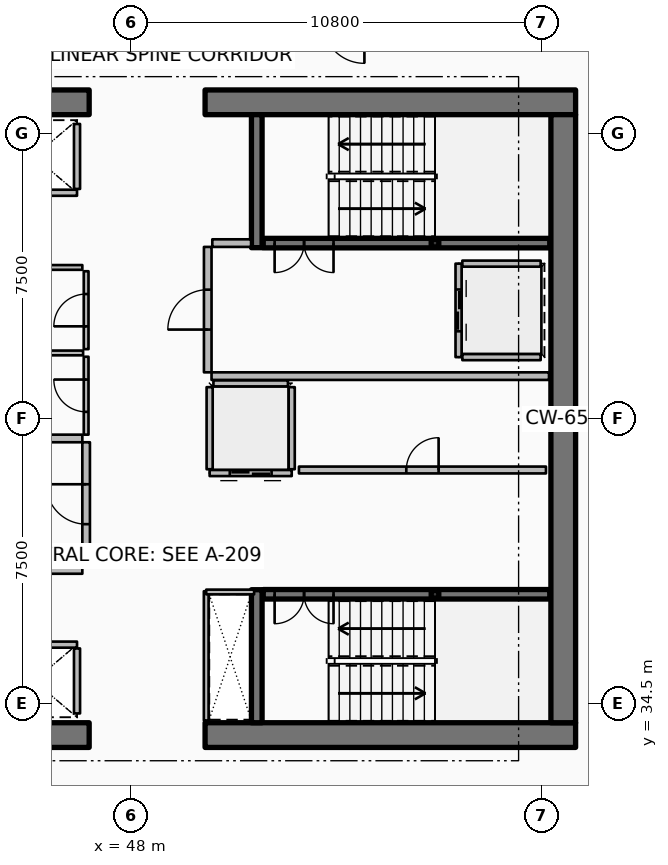
"""IFC4 building model, lengths in metres.
Left out: names, types, materials, properties, quantities, classifications, styles, units other than length and angle.
Written with IfcOpenShell. Run it as: python <this file> out.ifc"""

import sys

from ifc_helpers import new_model, si_unit, direction, frame, frame_2d, origin, origin_2d, place, context, subcontext, project, spatial, rectangle, hollow_rectangle, extrude, element, fill, save


model = new_model("IFC4")
c1 = context("Model", 3, precision=1e-05, world=origin(), true_north=direction((0.0, 1.0)))
c2 = subcontext(c1, "Body", "Model", "MODEL_VIEW")
j1 = project(units=[si_unit("LENGTHUNIT", "METRE"), si_unit("PLANEANGLEUNIT", "RADIAN")], contexts=[c1])
p1 = place(None, origin())
s1 = spatial("IfcSite", under=j1, at=p1, CompositionType="ELEMENT")
p2 = place(p1, origin())
s2 = spatial("IfcBuilding", under=s1, at=p2, CompositionType="ELEMENT")
p3 = place(p2, frame((0.0, 0.0, 187.8)))
s3 = spatial("IfcBuildingStorey", under=s2, at=p3, CompositionType="ELEMENT", Elevation=187.8)
for number, where, z_axis, x_axis in (
    (1, (37.15, 33.675, 0.0), (0.0, 0.0, 1.0), (1.0, 0.0, 0.0)),
    (2, (49.95, 33.675, 0.0), (0.0, 0.0, 1.0), (1.0, 0.0, 0.0)),
    (3, (37.15, 50.325, 0.0), (0.0, 0.0, 1.0), (1.0, 0.0, 0.0)),
    (4, (49.95, 50.325, 0.0), (0.0, 0.0, 1.0), (1.0, 0.0, 0.0)),
):
    element("IfcWall", number, at=place(p3, frame(where, z_axis=z_axis, x_axis=x_axis)), inside=s3, PredefinedType="SHEAR", context=c2, shape_type="SweptSolid", body=[
        extrude(rectangle(XDim=9.75, YDim=0.65, at=frame_2d((4.875, 0.0))), origin(), (0.0, 0.0, 1.0), 3.75),
    ])
p4 = place(p3, frame((59.375, 34.0, 0.0), z_axis=(0.0, 0.0, 1.0), x_axis=(0.0, 1.0, 0.0)))
e5 = element("IfcWall", 5, at=p4, inside=s3, PredefinedType="SHEAR", context=c2, shape_type="SweptSolid", body=[
    extrude(rectangle(XDim=16.0, YDim=0.65, at=frame_2d((8.0, 0.0))), origin(), (0.0, 0.0, 1.0), 3.75),
])
for number, where, z_axis, x_axis in (
    (6, (51.31, 46.5, 0.0), (0.0, 0.0, 1.0), (0.0, 1.0, 0.0)),
    (7, (51.31, 34.0, 0.0), (0.0, 0.0, 1.0), (0.0, 1.0, 0.0)),
):
    element("IfcWall", number, at=place(p3, frame(where, z_axis=z_axis, x_axis=x_axis)), inside=s3, PredefinedType="SHEAR", context=c2, shape_type="SweptSolid", body=[
        extrude(rectangle(XDim=3.5, YDim=0.28, at=frame_2d((1.75, 0.0))), origin(), (0.0, 0.0, 1.0), 3.75),
    ])
for number, where, z_axis, x_axis in (
    (8, (56.0, 46.62, 0.0), (0.0, 0.0, 1.0), (1.0, 0.0, 0.0)),
    (9, (56.0, 37.38, 0.0), (0.0, 0.0, 1.0), (1.0, 0.0, 0.0)),
):
    element("IfcColumn", number, at=place(p3, frame(where, z_axis=z_axis, x_axis=x_axis)), inside=s3, PredefinedType="COLUMN", context=c2, shape_type="SweptSolid", body=[
        extrude(hollow_rectangle(XDim=0.2, YDim=0.2, WallThickness=0.01, InnerFilletRadius=0.01, OuterFilletRadius=0.02, at=origin_2d()), origin(), (0.0, 0.0, 1.0), 1.67),
    ])
p5 = place(p3, frame((51.48, 46.62, 0.0), z_axis=(0.0, 0.0, 1.0), x_axis=(1.0, 0.0, 0.0)))
e10 = element("IfcWall", 10, at=p5, inside=s3, PredefinedType="SOLIDWALL", context=c2, shape_type="SweptSolid", body=[
    extrude(rectangle(XDim=7.54, YDim=0.25, at=frame_2d((3.77, 0.0))), origin(), (0.0, 0.0, 1.0), 3.5),
])
p6 = place(p5, frame((0.3, 0.0, 0.0)))
e11 = element("IfcOpeningElement", 11, at=p6, cuts=e10, PredefinedType="OPENING", context=c2, shape_type="SweptSolid", body=[
    extrude(rectangle(XDim=1.55, YDim=2.15, at=frame_2d((0.775, 1.075))), frame((0.0, 0.135, 0.0), z_axis=(0.0, -1.0, 0.0), x_axis=(1.0, 0.0, 0.0)), (0.0, 0.0, 1.0), 0.27),
])
p7 = place(p3, frame((51.48, 37.38, 0.0), z_axis=(0.0, 0.0, 1.0), x_axis=(1.0, 0.0, 0.0)))
e12 = element("IfcWall", 12, at=p7, inside=s3, PredefinedType="SOLIDWALL", context=c2, shape_type="SweptSolid", body=[
    extrude(rectangle(XDim=7.54, YDim=0.25, at=frame_2d((3.77, 0.0))), origin(), (0.0, 0.0, 1.0), 3.5),
])
p8 = place(p7, frame((0.3, 0.0, 0.0)))
e13 = element("IfcOpeningElement", 13, at=p8, cuts=e12, PredefinedType="OPENING", context=c2, shape_type="SweptSolid", body=[
    extrude(rectangle(XDim=1.55, YDim=2.15, at=frame_2d((0.775, 1.075))), frame((0.0, 0.135, 0.0), z_axis=(0.0, -1.0, 0.0), x_axis=(1.0, 0.0, 0.0)), (0.0, 0.0, 1.0), 0.27),
])
p9 = place(p3, frame((46.58, 47.945, 0.0), z_axis=(0.0, 0.0, 1.0), x_axis=(-1.0, 0.0, 0.0)))
e14 = element("IfcWall", 14, at=p9, inside=s3, PredefinedType="PARTITIONING", context=c2, shape_type="SweptSolid", body=[
    extrude(rectangle(XDim=2.26, YDim=0.16, at=frame_2d((1.13, 0.0))), origin(), (0.0, 0.0, 1.0), 3.5),
])
p10 = place(p3, frame((46.58, 48.045, 0.0), z_axis=(0.0, 0.0, 1.0), x_axis=(0.0, 1.0, 0.0)))
e15 = element("IfcWall", 15, at=p10, inside=s3, PredefinedType="PARTITIONING", context=c2, shape_type="SweptSolid", body=[
    extrude(rectangle(XDim=1.71, YDim=0.16, at=frame_2d((0.855, 0.0))), origin(), (0.0, 0.0, 1.0), 3.5),
])
p11 = place(p3, frame((44.32, 36.055, 0.0), z_axis=(0.0, 0.0, 1.0), x_axis=(1.0, 0.0, 0.0)))
e16 = element("IfcWall", 16, at=p11, inside=s3, PredefinedType="PARTITIONING", context=c2, shape_type="SweptSolid", body=[
    extrude(rectangle(XDim=2.26, YDim=0.16, at=frame_2d((1.13, 0.0))), origin(), (0.0, 0.0, 1.0), 3.5),
])
p12 = place(p3, frame((46.58, 34.245, 0.0), z_axis=(0.0, 0.0, 1.0), x_axis=(0.0, 1.0, 0.0)))
e17 = element("IfcWall", 17, at=p12, inside=s3, PredefinedType="PARTITIONING", context=c2, shape_type="SweptSolid", body=[
    extrude(rectangle(XDim=1.71, YDim=0.16, at=frame_2d((0.855, 0.0))), origin(), (0.0, 0.0, 1.0), 3.5),
])
p13 = place(p3, frame((56.62, 46.08, 0.0), z_axis=(0.0, 0.0, 1.0), x_axis=(0.0, -1.0, 0.0)))
e18 = element("IfcWall", 18, at=p13, inside=s3, PredefinedType="PARTITIONING", context=c2, shape_type="SweptSolid", body=[
    extrude(rectangle(XDim=2.46, YDim=0.16, at=frame_2d((1.23, 0.0))), origin(), (0.0, 0.0, 1.0), 3.5),
])
p14 = place(p13, frame((0.68, 0.0, 0.0)))
e19 = element("IfcOpeningElement", 19, at=p14, cuts=e18, PredefinedType="OPENING", context=c2, shape_type="SweptSolid", body=[
    extrude(rectangle(XDim=1.1, YDim=2.1, at=frame_2d((0.55, 1.05))), frame((0.0, 0.09, 0.0), z_axis=(0.0, -1.0, 0.0), x_axis=(1.0, 0.0, 0.0)), (0.0, 0.0, 1.0), 0.18),
])
for number, where, z_axis, x_axis in (
    (20, (56.72, 46.08, 0.0), (0.0, 0.0, 1.0), (1.0, 0.0, 0.0)),
    (21, (56.72, 43.62, 0.0), (0.0, 0.0, 1.0), (1.0, 0.0, 0.0)),
):
    element("IfcWall", number, at=place(p3, frame(where, z_axis=z_axis, x_axis=x_axis)), inside=s3, PredefinedType="PARTITIONING", context=c2, shape_type="SweptSolid", body=[
        extrude(rectangle(XDim=2.06, YDim=0.16, at=frame_2d((1.03, 0.0))), origin(), (0.0, 0.0, 1.0), 3.5),
    ])
p15 = place(p3, frame((52.23, 40.57, 0.0), z_axis=(0.0, 0.0, 1.0), x_axis=(-1.0, 0.0, 0.0)))
e22 = element("IfcWall", 22, at=p15, inside=s3, PredefinedType="PARTITIONING", context=c2, shape_type="SweptSolid", body=[
    extrude(rectangle(XDim=2.16, YDim=0.16, at=frame_2d((1.08, 0.0))), origin(), (0.0, 0.0, 1.0), 3.5),
])
p16 = place(p15, frame((0.53, 0.0, 0.0)))
e23 = element("IfcOpeningElement", 23, at=p16, cuts=e22, PredefinedType="OPENING", context=c2, shape_type="SweptSolid", body=[
    extrude(rectangle(XDim=1.1, YDim=2.1, at=frame_2d((0.55, 1.05))), frame((0.0, 0.09, 0.0), z_axis=(0.0, -1.0, 0.0), x_axis=(1.0, 0.0, 0.0)), (0.0, 0.0, 1.0), 0.18),
])
for number, where, z_axis, x_axis in (
    (24, (52.23, 40.67, 0.0), (0.0, 0.0, 1.0), (0.0, 1.0, 0.0)),
    (25, (50.07, 40.67, 0.0), (0.0, 0.0, 1.0), (0.0, 1.0, 0.0)),
):
    element("IfcWall", number, at=place(p3, frame(where, z_axis=z_axis, x_axis=x_axis)), inside=s3, PredefinedType="PARTITIONING", context=c2, shape_type="SweptSolid", body=[
        extrude(rectangle(XDim=2.16, YDim=0.16, at=frame_2d((1.08, 0.0))), origin(), (0.0, 0.0, 1.0), 3.5),
    ])
p17 = place(p3, frame((50.17, 42.93, 0.0), z_axis=(0.0, 0.0, 1.0), x_axis=(1.0, 0.0, 0.0)))
e26 = element("IfcWall", 26, at=p17, inside=s3, PredefinedType="PARTITIONING", context=c2, shape_type="SweptSolid", body=[
    extrude(rectangle(XDim=1.96, YDim=0.16, at=frame_2d((0.98, 0.0))), origin(), (0.0, 0.0, 1.0), 3.5),
])
p18 = place(p3, frame((52.42, 40.65, 0.0), z_axis=(0.0, 0.0, 1.0), x_axis=(1.0, 0.0, 0.0)))
e27 = element("IfcWall", 27, at=p18, inside=s3, PredefinedType="PARTITIONING", context=c2, shape_type="SweptSolid", body=[
    extrude(rectangle(XDim=6.5, YDim=0.18, at=frame_2d((3.25, 0.0))), origin(), (0.0, 0.0, 1.0), 3.5),
])
p19 = place(p18, frame((2.825, 0.0, 0.0)))
e28 = element("IfcOpeningElement", 28, at=p19, cuts=e27, PredefinedType="OPENING", context=c2, shape_type="SweptSolid", body=[
    extrude(rectangle(XDim=0.85, YDim=2.06, at=frame_2d((0.425, 1.03))), frame((0.0, 0.1, 0.0), z_axis=(0.0, -1.0, 0.0), x_axis=(1.0, 0.0, 0.0)), (0.0, 0.0, 1.0), 0.2),
])
p20 = place(p3, frame((41.35, 38.02, 0.0), z_axis=(0.0, 0.0, 1.0), x_axis=(1.0, 0.0, 0.0)))
e29 = element("IfcWall", 29, at=p20, inside=s3, PredefinedType="PARTITIONING", context=c2, shape_type="SweptSolid", body=[
    extrude(rectangle(XDim=5.37, YDim=0.2, at=frame_2d((2.685, 0.0))), origin(), (0.0, 0.0, 1.0), 3.5),
])
p21 = place(p3, frame((43.92, 41.48, 0.0), z_axis=(0.0, 0.0, 1.0), x_axis=(1.0, 0.0, 0.0)))
e30 = element("IfcWall", 30, at=p21, inside=s3, PredefinedType="PARTITIONING", context=c2, shape_type="SweptSolid", body=[
    extrude(rectangle(XDim=2.8, YDim=0.2, at=frame_2d((1.4, 0.0))), origin(), (0.0, 0.0, 1.0), 3.5),
])
p22 = place(p3, frame((46.82, 38.12, 0.0), z_axis=(0.0, 0.0, 1.0), x_axis=(0.0, 1.0, 0.0)))
e31 = element("IfcWall", 31, at=p22, inside=s3, PredefinedType="PARTITIONING", context=c2, shape_type="SweptSolid", body=[
    extrude(rectangle(XDim=3.26, YDim=0.2, at=frame_2d((1.63, 0.0))), origin(), (0.0, 0.0, 1.0), 3.5),
])
p23 = place(p22, frame((1.105, 0.0, 0.0)))
e32 = element("IfcOpeningElement", 32, at=p23, cuts=e31, PredefinedType="OPENING", context=c2, shape_type="SweptSolid", body=[
    extrude(rectangle(XDim=1.05, YDim=2.1, at=frame_2d((0.525, 1.05))), frame((0.0, 0.11, 0.0), z_axis=(0.0, -1.0, 0.0), x_axis=(1.0, 0.0, 0.0)), (0.0, 0.0, 1.0), 0.22),
])
p24 = place(p3, frame((50.12, 43.12, 0.0), z_axis=(0.0, 0.0, 1.0), x_axis=(1.0, 0.0, 0.0)))
e33 = element("IfcWall", 33, at=p24, inside=s3, PredefinedType="PARTITIONING", context=c2, shape_type="SweptSolid", body=[
    extrude(rectangle(XDim=8.88, YDim=0.2, at=frame_2d((4.44, 0.0))), origin(), (0.0, 0.0, 1.0), 3.5),
])
p25 = place(p3, frame((50.14, 46.62, 0.0), z_axis=(0.0, 0.0, 1.0), x_axis=(1.0, 0.0, 0.0)))
e34 = element("IfcWall", 34, at=p25, inside=s3, PredefinedType="PARTITIONING", context=c2, shape_type="SweptSolid", body=[
    extrude(rectangle(XDim=1.02, YDim=0.2, at=frame_2d((0.51, 0.0))), origin(), (0.0, 0.0, 1.0), 3.5),
])
p26 = place(p3, frame((50.02, 43.22, 0.0), z_axis=(0.0, 0.0, 1.0), x_axis=(0.0, 1.0, 0.0)))
e35 = element("IfcWall", 35, at=p26, inside=s3, PredefinedType="PARTITIONING", context=c2, shape_type="SweptSolid", body=[
    extrude(rectangle(XDim=3.3, YDim=0.2, at=frame_2d((1.65, 0.0))), origin(), (0.0, 0.0, 1.0), 3.5),
])
p27 = place(p26, frame((1.125, 0.0, 0.0)))
e36 = element("IfcOpeningElement", 36, at=p27, cuts=e35, PredefinedType="OPENING", context=c2, shape_type="SweptSolid", body=[
    extrude(rectangle(XDim=1.05, YDim=2.1, at=frame_2d((0.525, 1.05))), frame((0.0, 0.11, 0.0), z_axis=(0.0, -1.0, 0.0), x_axis=(1.0, 0.0, 0.0)), (0.0, 0.0, 1.0), 0.22),
])
p28 = place(p3, frame((41.36, 45.98, 0.0), z_axis=(0.0, 0.0, 1.0), x_axis=(1.0, 0.0, 0.0)))
e37 = element("IfcWall", 37, at=p28, inside=s3, PredefinedType="PARTITIONING", context=c2, shape_type="SweptSolid", body=[
    extrude(rectangle(XDim=5.36, YDim=0.125, at=frame_2d((2.68, 0.0))), origin(), (0.0, 0.0, 1.0), 2.94),
])
p29 = place(p3, frame((49.98, 34.06, 0.0), z_axis=(0.0, 0.0, 1.0), x_axis=(0.0, 1.0, 0.0)))
e38 = element("IfcWall", 38, at=p29, inside=s3, PredefinedType="PARTITIONING", context=c2, shape_type="SweptSolid", body=[
    extrude(rectangle(XDim=3.4, YDim=0.125, at=frame_2d((1.7, 0.0))), origin(), (0.0, 0.0, 1.0), 2.94),
])
p30 = place(p3, frame((49.98, 37.44, 0.0), z_axis=(0.0, 0.0, 1.0), x_axis=(1.0, 0.0, 0.0)))
e39 = element("IfcWall", 39, at=p30, inside=s3, PredefinedType="PARTITIONING", context=c2, shape_type="SweptSolid", body=[
    extrude(rectangle(XDim=1.26, YDim=0.125, at=frame_2d((0.63, 0.0))), origin(), (0.0, 0.0, 1.0), 2.94),
])
p31 = place(p3, frame((44.03, 43.73, 0.0), z_axis=(0.0, 0.0, 1.0), x_axis=(1.0, 0.0, 0.0)))
e40 = element("IfcWall", 40, at=p31, inside=s3, PredefinedType="PARTITIONING", context=c2, shape_type="SweptSolid", body=[
    extrude(rectangle(XDim=2.71, YDim=0.125, at=frame_2d((1.355, 0.0))), origin(), (0.0, 0.0, 1.0), 2.94),
])
p32 = place(p3, frame((46.82, 41.58, 0.0), z_axis=(0.0, 0.0, 1.0), x_axis=(0.0, 1.0, 0.0)))
e41 = element("IfcWall", 41, at=p32, inside=s3, PredefinedType="PARTITIONING", context=c2, shape_type="SweptSolid", body=[
    extrude(rectangle(XDim=2.05, YDim=0.125, at=frame_2d((1.025, 0.0))), origin(), (0.0, 0.0, 1.0), 2.94),
])
p33 = place(p32, frame((0.6, 0.0, 0.0)))
e42 = element("IfcOpeningElement", 42, at=p33, cuts=e41, PredefinedType="OPENING", context=c2, shape_type="SweptSolid", body=[
    extrude(rectangle(XDim=0.85, YDim=2.06, at=frame_2d((0.425, 1.03))), frame((0.0, 0.073, 0.0), z_axis=(0.0, -1.0, 0.0), x_axis=(1.0, 0.0, 0.0)), (0.0, 0.0, 1.0), 0.145),
])
p34 = place(p3, frame((46.82, 43.83, 0.0), z_axis=(0.0, 0.0, 1.0), x_axis=(0.0, 1.0, 0.0)))
e43 = element("IfcWall", 43, at=p34, inside=s3, PredefinedType="PARTITIONING", context=c2, shape_type="SweptSolid", body=[
    extrude(rectangle(XDim=2.05, YDim=0.125, at=frame_2d((1.025, 0.0))), origin(), (0.0, 0.0, 1.0), 2.94),
])
p35 = place(p34, frame((0.6, 0.0, 0.0)))
e44 = element("IfcOpeningElement", 44, at=p35, cuts=e43, PredefinedType="OPENING", context=c2, shape_type="SweptSolid", body=[
    extrude(rectangle(XDim=0.85, YDim=2.06, at=frame_2d((0.425, 1.03))), frame((0.0, 0.073, 0.0), z_axis=(0.0, -1.0, 0.0), x_axis=(1.0, 0.0, 0.0)), (0.0, 0.0, 1.0), 0.145),
])
p36 = place(p6, origin())
e45 = element("IfcDoor", 45, at=p36, inside=s3, OperationType="DOUBLE_DOOR_SINGLE_SWING", PredefinedType="DOOR", context=c2, shape_type="SweptSolid", body=[
    extrude(rectangle(XDim=1.55, YDim=2.15, at=frame_2d((0.775, 1.075))), frame((0.0, 0.025, 0.0), z_axis=(0.0, -1.0, 0.0), x_axis=(1.0, 0.0, 0.0)), (0.0, 0.0, 1.0), 0.05),
])
fill(e11, e45)
p37 = place(p8, origin())
e46 = element("IfcDoor", 46, at=p37, inside=s3, OperationType="DOUBLE_DOOR_SINGLE_SWING", PredefinedType="DOOR", context=c2, shape_type="SweptSolid", body=[
    extrude(rectangle(XDim=1.55, YDim=2.15, at=frame_2d((0.775, 1.075))), frame((0.0, 0.025, 0.0), z_axis=(0.0, -1.0, 0.0), x_axis=(1.0, 0.0, 0.0)), (0.0, 0.0, 1.0), 0.05),
])
fill(e13, e46)
p38 = place(p14, origin())
e47 = element("IfcDoor", 47, at=p38, inside=s3, OperationType="DOUBLE_DOOR_SLIDING", PredefinedType="DOOR", context=c2, shape_type="SweptSolid", body=[
    extrude(rectangle(XDim=1.1, YDim=2.1, at=frame_2d((0.55, 1.05))), frame((0.0, 0.025, 0.0), z_axis=(0.0, -1.0, 0.0), x_axis=(1.0, 0.0, 0.0)), (0.0, 0.0, 1.0), 0.05),
])
fill(e19, e47)
p39 = place(p16, origin())
e48 = element("IfcDoor", 48, at=p39, inside=s3, OperationType="DOUBLE_DOOR_SLIDING", PredefinedType="DOOR", context=c2, shape_type="SweptSolid", body=[
    extrude(rectangle(XDim=1.1, YDim=2.1, at=frame_2d((0.55, 1.05))), frame((0.0, 0.025, 0.0), z_axis=(0.0, -1.0, 0.0), x_axis=(1.0, 0.0, 0.0)), (0.0, 0.0, 1.0), 0.05),
])
fill(e23, e48)
p40 = place(p19, origin())
e49 = element("IfcDoor", 49, at=p40, inside=s3, OperationType="SINGLE_SWING_RIGHT", PredefinedType="DOOR", context=c2, shape_type="SweptSolid", body=[
    extrude(rectangle(XDim=0.85, YDim=2.06, at=frame_2d((0.425, 1.03))), frame((0.0, 0.025, 0.0), z_axis=(0.0, -1.0, 0.0), x_axis=(1.0, 0.0, 0.0)), (0.0, 0.0, 1.0), 0.05),
])
fill(e28, e49)
p41 = place(p23, origin())
e50 = element("IfcDoor", 50, at=p41, inside=s3, OperationType="SINGLE_SWING_RIGHT", PredefinedType="DOOR", context=c2, shape_type="SweptSolid", body=[
    extrude(rectangle(XDim=1.05, YDim=2.1, at=frame_2d((0.525, 1.05))), frame((0.0, 0.025, 0.0), z_axis=(0.0, -1.0, 0.0), x_axis=(1.0, 0.0, 0.0)), (0.0, 0.0, 1.0), 0.05),
])
fill(e32, e50)
p42 = place(p27, origin())
e51 = element("IfcDoor", 51, at=p42, inside=s3, OperationType="SINGLE_SWING_LEFT", PredefinedType="DOOR", context=c2, shape_type="SweptSolid", body=[
    extrude(rectangle(XDim=1.05, YDim=2.1, at=frame_2d((0.525, 1.05))), frame((0.0, 0.025, 0.0), z_axis=(0.0, -1.0, 0.0), x_axis=(1.0, 0.0, 0.0)), (0.0, 0.0, 1.0), 0.05),
])
fill(e36, e51)
p43 = place(p33, origin())
e52 = element("IfcDoor", 52, at=p43, inside=s3, OperationType="SINGLE_SWING_RIGHT", PredefinedType="DOOR", context=c2, shape_type="SweptSolid", body=[
    extrude(rectangle(XDim=0.85, YDim=2.06, at=frame_2d((0.425, 1.03))), frame((0.0, 0.025, 0.0), z_axis=(0.0, -1.0, 0.0), x_axis=(1.0, 0.0, 0.0)), (0.0, 0.0, 1.0), 0.05),
])
fill(e42, e52)
p44 = place(p35, origin())
e53 = element("IfcDoor", 53, at=p44, inside=s3, OperationType="SINGLE_SWING_LEFT", PredefinedType="DOOR", context=c2, shape_type="SweptSolid", body=[
    extrude(rectangle(XDim=0.85, YDim=2.06, at=frame_2d((0.425, 1.03))), frame((0.0, 0.025, 0.0), z_axis=(0.0, -1.0, 0.0), x_axis=(1.0, 0.0, 0.0)), (0.0, 0.0, 1.0), 0.05),
])
fill(e44, e53)
save(model, sys.argv[1])
